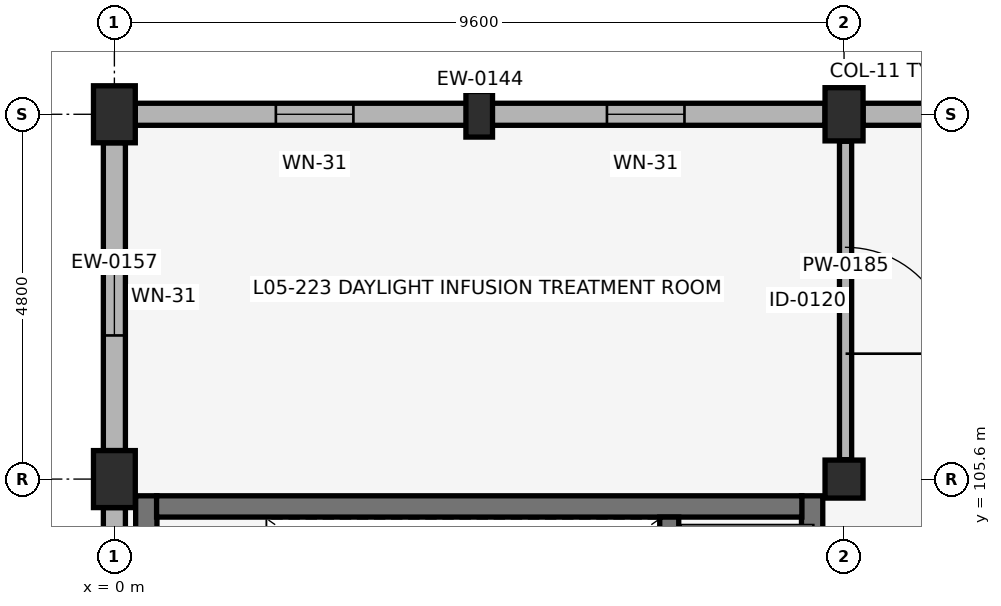
"""IFC4 building model, lengths in metres.
Left out: names, types, materials, properties, quantities, classifications, styles, units other than length and angle.
Written with IfcOpenShell. Run it as: python <this file> out.ifc"""

import sys

from ifc_helpers import new_model, si_unit, direction, frame, frame_2d, origin, origin_2d, place, context, subcontext, project, spatial, rectangle, extrude, element, fill, save


model = new_model("IFC4")
c1 = context("Model", 3, precision=1e-05, world=origin(), true_north=direction((0.0, 1.0)))
c2 = subcontext(c1, "Body", "Model", "MODEL_VIEW")
j1 = project(units=[si_unit("LENGTHUNIT", "METRE"), si_unit("PLANEANGLEUNIT", "RADIAN")], contexts=[c1])
p1 = place(None, origin())
s1 = spatial("IfcSite", under=j1, at=p1, CompositionType="ELEMENT")
p2 = place(p1, origin())
s2 = spatial("IfcBuilding", under=s1, at=p2, CompositionType="ELEMENT")
p3 = place(p2, frame((0.0, 0.0, 20.74)))
s3 = spatial("IfcBuildingStorey", under=s2, at=p3, CompositionType="ELEMENT", Elevation=20.74)
for number, where, z_axis, x_axis in (
    (1, (0.0, 105.6, 0.0), (0.0, 0.0, 1.0), (1.0, 0.0, 0.0)),
    (2, (0.0, 110.4, 0.0), (0.0, 0.0, 1.0), (1.0, 0.0, 0.0)),
):
    element("IfcColumn", number, at=place(p3, frame(where, z_axis=z_axis, x_axis=x_axis)), inside=s3, PredefinedType="COLUMN", context=c2, shape_type="SweptSolid", body=[
        extrude(rectangle(XDim=0.55, YDim=0.75, at=origin_2d()), origin(), (0.0, 0.0, 1.0), 4.08),
    ])
p4 = place(p3, frame((9.6, 105.6, 0.0), z_axis=(0.0, 0.0, 1.0), x_axis=(1.0, 0.0, 0.0)))
e3 = element("IfcColumn", 3, at=p4, inside=s3, PredefinedType="COLUMN", context=c2, shape_type="SweptSolid", body=[
    extrude(rectangle(XDim=0.5, YDim=0.5, at=origin_2d()), origin(), (0.0, 0.0, 1.0), 4.08),
])
p5 = place(p3, frame((9.6, 110.4, 0.0), z_axis=(0.0, 0.0, 1.0), x_axis=(1.0, 0.0, 0.0)))
e4 = element("IfcColumn", 4, at=p5, inside=s3, PredefinedType="COLUMN", context=c2, shape_type="SweptSolid", body=[
    extrude(rectangle(XDim=0.5, YDim=0.7, at=origin_2d()), origin(), (0.0, 0.0, 1.0), 4.08),
])
p6 = place(p3, frame((4.8, 110.4, 0.0), z_axis=(0.0, 0.0, 1.0), x_axis=(1.0, 0.0, 0.0)))
e5 = element("IfcColumn", 5, at=p6, inside=s3, PredefinedType="PILASTER", context=c2, shape_type="SweptSolid", body=[
    extrude(rectangle(XDim=0.35, YDim=0.6, at=origin_2d()), origin(), (0.0, 0.0, 1.0), 4.08),
])
p7 = place(p3, frame((9.35, 110.4, 0.0), z_axis=(0.0, 0.0, 1.0), x_axis=(-1.0, 0.0, 0.0)))
e6 = element("IfcWall", 6, at=p7, inside=s3, PredefinedType="SOLIDWALL", context=c2, shape_type="SweptSolid", body=[
    extrude(rectangle(XDim=9.075, YDim=0.29, at=frame_2d((4.538, 0.0))), origin(), (0.0, 0.0, 1.0), 3.07),
])
p8 = place(p7, frame((1.85, 0.0, 0.88)))
e7 = element("IfcOpeningElement", 7, at=p8, cuts=e6, PredefinedType="OPENING", context=c2, shape_type="SweptSolid", body=[
    extrude(rectangle(XDim=1.02, YDim=1.88, at=frame_2d((0.51, 0.94))), frame((0.0, 0.155, 0.0), z_axis=(0.0, -1.0, 0.0), x_axis=(1.0, 0.0, 0.0)), (0.0, 0.0, 1.0), 0.31),
])
p9 = place(p7, frame((6.206, 0.0, 0.88)))
e8 = element("IfcOpeningElement", 8, at=p9, cuts=e6, PredefinedType="OPENING", context=c2, shape_type="SweptSolid", body=[
    extrude(rectangle(XDim=1.02, YDim=1.88, at=frame_2d((0.51, 0.94))), frame((0.0, 0.155, 0.0), z_axis=(0.0, -1.0, 0.0), x_axis=(1.0, 0.0, 0.0)), (0.0, 0.0, 1.0), 0.31),
])
p10 = place(p3, frame((18.95, 110.4, 0.0), z_axis=(0.0, 0.0, 1.0), x_axis=(-1.0, 0.0, 0.0)))
e9 = element("IfcWall", 9, at=p10, inside=s3, PredefinedType="SOLIDWALL", context=c2, shape_type="SweptSolid", body=[
    extrude(rectangle(XDim=9.1, YDim=0.29, at=frame_2d((4.55, 0.0))), origin(), (0.0, 0.0, 1.0), 3.07),
])
p11 = place(p10, frame((1.856, 0.0, 0.88)))
e10 = element("IfcOpeningElement", 10, at=p11, cuts=e9, PredefinedType="OPENING", context=c2, shape_type="SweptSolid", body=[
    extrude(rectangle(XDim=1.02, YDim=1.88, at=frame_2d((0.51, 0.94))), frame((0.0, 0.155, 0.0), z_axis=(0.0, -1.0, 0.0), x_axis=(1.0, 0.0, 0.0)), (0.0, 0.0, 1.0), 0.31),
])
p12 = place(p10, frame((6.224, 0.0, 0.88)))
e11 = element("IfcOpeningElement", 11, at=p12, cuts=e9, PredefinedType="OPENING", context=c2, shape_type="SweptSolid", body=[
    extrude(rectangle(XDim=1.02, YDim=1.88, at=frame_2d((0.51, 0.94))), frame((0.0, 0.155, 0.0), z_axis=(0.0, -1.0, 0.0), x_axis=(1.0, 0.0, 0.0)), (0.0, 0.0, 1.0), 0.31),
])
p13 = place(p3, frame((0.0, 105.225, 0.0), z_axis=(0.0, 0.0, 1.0), x_axis=(0.0, -1.0, 0.0)))
e12 = element("IfcWall", 12, at=p13, inside=s3, PredefinedType="SOLIDWALL", context=c2, shape_type="SweptSolid", body=[
    extrude(rectangle(XDim=6.45, YDim=0.29, at=frame_2d((3.225, 0.0))), origin(), (0.0, 0.0, 1.0), 3.07),
])
p14 = place(p3, frame((0.0, 110.025, 0.0), z_axis=(0.0, 0.0, 1.0), x_axis=(0.0, -1.0, 0.0)))
e13 = element("IfcWall", 13, at=p14, inside=s3, PredefinedType="SOLIDWALL", context=c2, shape_type="SweptSolid", body=[
    extrude(rectangle(XDim=4.05, YDim=0.29, at=frame_2d((2.025, 0.0))), origin(), (0.0, 0.0, 1.0), 3.07),
])
p15 = place(p14, frame((1.515, 0.0, 0.88)))
e14 = element("IfcOpeningElement", 14, at=p15, cuts=e13, PredefinedType="OPENING", context=c2, shape_type="SweptSolid", body=[
    extrude(rectangle(XDim=1.02, YDim=1.88, at=frame_2d((0.51, 0.94))), frame((0.0, 0.155, 0.0), z_axis=(0.0, -1.0, 0.0), x_axis=(1.0, 0.0, 0.0)), (0.0, 0.0, 1.0), 0.31),
])
for number, where, z_axis, x_axis in (
    (15, (0.42, 101.3, 0.0), (0.0, 0.0, 1.0), (0.0, 1.0, 0.0)),
    (16, (9.18, 101.3, 0.0), (0.0, 0.0, 1.0), (0.0, 1.0, 0.0)),
):
    element("IfcWall", number, at=place(p3, frame(where, z_axis=z_axis, x_axis=x_axis)), inside=s3, PredefinedType="SHEAR", context=c2, shape_type="SweptSolid", body=[
        extrude(rectangle(XDim=4.08, YDim=0.28, at=frame_2d((2.04, 0.0))), origin(), (0.0, 0.0, 1.0), 3.8),
    ])
p16 = place(p3, frame((0.555, 105.24, 0.0), z_axis=(0.0, 0.0, 1.0), x_axis=(1.0, 0.0, 0.0)))
e17 = element("IfcWall", 17, at=p16, inside=s3, PredefinedType="SHEAR", context=c2, shape_type="SweptSolid", body=[
    extrude(rectangle(XDim=8.49, YDim=0.28, at=frame_2d((4.245, 0.0))), origin(), (0.0, 0.0, 1.0), 3.8),
])
p17 = place(p3, frame((7.3, 101.56, 0.0), z_axis=(0.0, 0.0, 1.0), x_axis=(0.0, 1.0, 0.0)))
e18 = element("IfcWall", 18, at=p17, inside=s3, PredefinedType="SHEAR", context=c2, shape_type="SweptSolid", body=[
    extrude(rectangle(XDim=3.54, YDim=0.25, at=frame_2d((1.77, 0.0))), origin(), (0.0, 0.0, 1.0), 3.8),
])
p18 = place(p3, frame((9.62, 105.855, 0.0), z_axis=(0.0, 0.0, 1.0), x_axis=(0.0, 1.0, 0.0)))
e19 = element("IfcWall", 19, at=p18, inside=s3, PredefinedType="PARTITIONING", context=c2, shape_type="SweptSolid", body=[
    extrude(rectangle(XDim=4.19, YDim=0.16, at=frame_2d((2.095, 0.0))), origin(), (0.0, 0.0, 1.0), 3.12),
])
p19 = place(p18, frame((1.395, 0.0, 0.0)))
e20 = element("IfcOpeningElement", 20, at=p19, cuts=e19, PredefinedType="OPENING", context=c2, shape_type="SweptSolid", body=[
    extrude(rectangle(XDim=1.4, YDim=2.12, at=frame_2d((0.7, 1.06))), frame((0.0, 0.09, 0.0), z_axis=(0.0, -1.0, 0.0), x_axis=(1.0, 0.0, 0.0)), (0.0, 0.0, 1.0), 0.18),
])
p20 = place(p8, origin())
e21 = element("IfcWindow", 21, at=p20, inside=s3, PartitioningType="SINGLE_PANEL", PredefinedType="WINDOW", context=c2, shape_type="SweptSolid", body=[
    extrude(rectangle(XDim=1.02, YDim=1.88, at=frame_2d((0.51, 0.94))), frame((0.0, 0.03, 0.0), z_axis=(0.0, -1.0, 0.0), x_axis=(1.0, 0.0, 0.0)), (0.0, 0.0, 1.0), 0.06),
])
fill(e7, e21)
p21 = place(p9, origin())
e22 = element("IfcWindow", 22, at=p21, inside=s3, PartitioningType="SINGLE_PANEL", PredefinedType="WINDOW", context=c2, shape_type="SweptSolid", body=[
    extrude(rectangle(XDim=1.02, YDim=1.88, at=frame_2d((0.51, 0.94))), frame((0.0, 0.03, 0.0), z_axis=(0.0, -1.0, 0.0), x_axis=(1.0, 0.0, 0.0)), (0.0, 0.0, 1.0), 0.06),
])
fill(e8, e22)
p22 = place(p15, origin())
e23 = element("IfcWindow", 23, at=p22, inside=s3, PartitioningType="SINGLE_PANEL", PredefinedType="WINDOW", context=c2, shape_type="SweptSolid", body=[
    extrude(rectangle(XDim=1.02, YDim=1.88, at=frame_2d((0.51, 0.94))), frame((0.0, 0.03, 0.0), z_axis=(0.0, -1.0, 0.0), x_axis=(1.0, 0.0, 0.0)), (0.0, 0.0, 1.0), 0.06),
])
fill(e14, e23)
p23 = place(p19, origin())
e24 = element("IfcDoor", 24, at=p23, inside=s3, OperationType="SINGLE_SWING_RIGHT", PredefinedType="DOOR", context=c2, shape_type="SweptSolid", body=[
    extrude(rectangle(XDim=1.4, YDim=2.12, at=frame_2d((0.7, 1.06))), frame((0.0, 0.025, 0.0), z_axis=(0.0, -1.0, 0.0), x_axis=(1.0, 0.0, 0.0)), (0.0, 0.0, 1.0), 0.05),
])
fill(e20, e24)
save(model, sys.argv[1])
